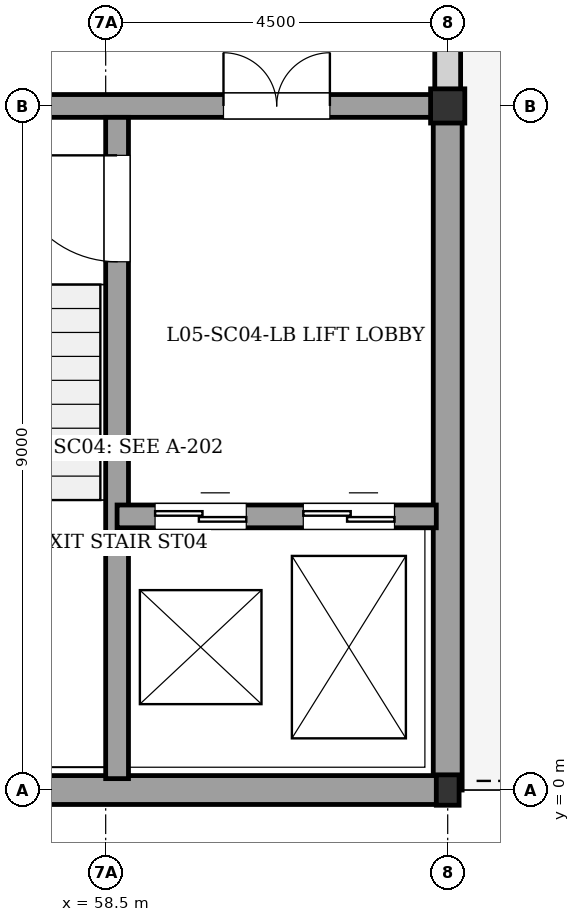
"""IFC4 building model, lengths in metres.
Left out: names, types, materials, properties, quantities, classifications, styles, units other than length and angle.
Written with IfcOpenShell. Run it as: python <this file> out.ifc"""

import sys

from ifc_helpers import new_model, si_unit, direction, frame, frame_2d, origin, origin_2d, place, context, subcontext, project, spatial, rectangle, i_section, extrude, element, fill, save


model = new_model("IFC4")
c1 = context("Model", 3, precision=1e-05, world=origin(), true_north=direction((0.0, 1.0)))
c2 = subcontext(c1, "Body", "Model", "MODEL_VIEW")
j1 = project(units=[si_unit("LENGTHUNIT", "METRE"), si_unit("PLANEANGLEUNIT", "RADIAN")], contexts=[c1])
p1 = place(None, origin())
s1 = spatial("IfcSite", under=j1, at=p1, CompositionType="ELEMENT")
p2 = place(p1, origin())
s2 = spatial("IfcBuilding", under=s1, at=p2, CompositionType="ELEMENT")
p3 = place(p2, frame((0.0, 0.0, 17.6)))
s3 = spatial("IfcBuildingStorey", under=s2, at=p3, CompositionType="ELEMENT", Elevation=17.6)
p4 = place(p3, frame((63.0, 0.0, 0.0), z_axis=(0.0, 0.0, 1.0), x_axis=(1.0, 0.0, 0.0)))
e1 = element("IfcColumn", 1, at=p4, inside=s3, PredefinedType="COLUMN", context=c2, shape_type="SweptSolid", body=[
    extrude(i_section(OverallWidth=0.3, OverallDepth=0.4, WebThickness=0.013, FlangeThickness=0.024, at=origin_2d()), origin(), (0.0, 0.0, 1.0), 3.04),
])
p5 = place(p3, frame((63.0, 9.0, 0.0), z_axis=(0.0, 0.0, 1.0), x_axis=(1.0, 0.0, 0.0)))
e2 = element("IfcColumn", 2, at=p5, inside=s3, PredefinedType="COLUMN", context=c2, shape_type="SweptSolid", body=[
    extrude(rectangle(XDim=0.45, YDim=0.45, at=origin_2d()), origin(), (0.0, 0.0, 1.0), 3.04),
])
p6 = place(p3, frame((63.0, 17.845, 0.0), z_axis=(0.0, 0.0, 1.0), x_axis=(0.0, -1.0, 0.0)))
e3 = element("IfcWall", 3, at=p6, inside=s3, PredefinedType="SOLIDWALL", context=c2, shape_type="SweptSolid", body=[
    extrude(rectangle(XDim=8.715, YDim=0.34, at=frame_2d((4.357, 0.0))), origin(), (0.0, 0.0, 1.0), 2.45),
])
p7 = place(p6, frame((3.545, 0.0, 0.0)))
e4 = element("IfcOpeningElement", 4, at=p7, cuts=e3, PredefinedType="OPENING", context=c2, shape_type="SweptSolid", body=[
    extrude(rectangle(XDim=1.6, YDim=2.25, at=frame_2d((0.8, 1.125))), frame((0.0, 0.18, 0.0), z_axis=(0.0, -1.0, 0.0), x_axis=(1.0, 0.0, 0.0)), (0.0, 0.0, 1.0), 0.36),
])
for number, where, z_axis, x_axis in (
    (5, (63.0, 9.0, 0.0), (0.0, 0.0, 1.0), (0.0, -1.0, 0.0)),
    (6, (63.0, 0.0, 0.0), (0.0, 0.0, 1.0), (-1.0, 0.0, 0.0)),
):
    element("IfcWall", number, at=place(p3, frame(where, z_axis=z_axis, x_axis=x_axis)), inside=s3, PredefinedType="SOLIDWALL", context=c2, shape_type="SweptSolid", body=[
        extrude(rectangle(XDim=9.0, YDim=0.38, at=frame_2d((4.5, 0.0))), origin(), (0.0, 0.0, 1.0), 2.82),
    ])
p8 = place(p3, frame((54.0, 9.0, 0.0), z_axis=(0.0, 0.0, 1.0), x_axis=(1.0, 0.0, 0.0)))
e7 = element("IfcWall", 7, at=p8, inside=s3, PredefinedType="SHEAR", context=c2, shape_type="SweptSolid", body=[
    extrude(rectangle(XDim=9.0, YDim=0.3, at=frame_2d((4.5, 0.0))), origin(), (0.0, 0.0, 1.0), 2.82),
])
p9 = place(p8, frame((6.05, 0.0, 0.0)))
e8 = element("IfcOpeningElement", 8, at=p9, cuts=e7, PredefinedType="OPENING", context=c2, shape_type="SweptSolid", body=[
    extrude(rectangle(XDim=1.4, YDim=2.02, at=frame_2d((0.7, 1.01))), frame((0.0, 0.16, 0.0), z_axis=(0.0, -1.0, 0.0), x_axis=(1.0, 0.0, 0.0)), (0.0, 0.0, 1.0), 0.32),
])
p10 = place(p3, frame((58.65, 0.15, 0.0), z_axis=(0.0, 0.0, 1.0), x_axis=(0.0, 1.0, 0.0)))
e9 = element("IfcWall", 9, at=p10, inside=s3, PredefinedType="SHEAR", context=c2, shape_type="SweptSolid", body=[
    extrude(rectangle(XDim=8.7, YDim=0.3, at=frame_2d((4.35, 0.0))), origin(), (0.0, 0.0, 1.0), 2.82),
])
p11 = place(p10, frame((6.8, 0.0, 0.0)))
e10 = element("IfcOpeningElement", 10, at=p11, cuts=e9, PredefinedType="OPENING", context=c2, shape_type="SweptSolid", body=[
    extrude(rectangle(XDim=1.4, YDim=2.02, at=frame_2d((0.7, 1.01))), frame((0.0, 0.16, 0.0), z_axis=(0.0, -1.0, 0.0), x_axis=(1.0, 0.0, 0.0)), (0.0, 0.0, 1.0), 0.32),
])
p12 = place(p3, frame((58.65, 3.6, 0.0), z_axis=(0.0, 0.0, 1.0), x_axis=(1.0, 0.0, 0.0)))
e11 = element("IfcWall", 11, at=p12, inside=s3, PredefinedType="SHEAR", context=c2, shape_type="SweptSolid", body=[
    extrude(rectangle(XDim=4.2, YDim=0.3, at=frame_2d((2.1, 0.0))), origin(), (0.0, 0.0, 1.0), 2.82),
])
p13 = place(p12, frame((0.5, 0.0, 0.0)))
e12 = element("IfcOpeningElement", 12, at=p13, cuts=e11, PredefinedType="OPENING", context=c2, shape_type="SweptSolid", body=[
    extrude(rectangle(XDim=1.2, YDim=2.2, at=frame_2d((0.6, 1.1))), frame((0.0, 0.16, 0.0), z_axis=(0.0, -1.0, 0.0), x_axis=(1.0, 0.0, 0.0)), (0.0, 0.0, 1.0), 0.32),
])
p14 = place(p12, frame((2.45, 0.0, 0.0)))
e13 = element("IfcOpeningElement", 13, at=p14, cuts=e11, PredefinedType="OPENING", context=c2, shape_type="SweptSolid", body=[
    extrude(rectangle(XDim=1.2, YDim=2.2, at=frame_2d((0.6, 1.1))), frame((0.0, 0.16, 0.0), z_axis=(0.0, -1.0, 0.0), x_axis=(1.0, 0.0, 0.0)), (0.0, 0.0, 1.0), 0.32),
])
p15 = place(p9, origin())
e14 = element("IfcDoor", 14, at=p15, inside=s3, OperationType="DOUBLE_DOOR_SINGLE_SWING", PredefinedType="DOOR", context=c2, shape_type="SweptSolid", body=[
    extrude(rectangle(XDim=1.4, YDim=2.02, at=frame_2d((0.7, 1.01))), frame((0.0, 0.025, 0.0), z_axis=(0.0, -1.0, 0.0), x_axis=(1.0, 0.0, 0.0)), (0.0, 0.0, 1.0), 0.05),
])
fill(e8, e14)
p16 = place(p11, origin())
e15 = element("IfcDoor", 15, at=p16, inside=s3, OperationType="SINGLE_SWING_RIGHT", PredefinedType="DOOR", context=c2, shape_type="SweptSolid", body=[
    extrude(rectangle(XDim=1.4, YDim=2.02, at=frame_2d((0.7, 1.01))), frame((0.0, 0.025, 0.0), z_axis=(0.0, -1.0, 0.0), x_axis=(1.0, 0.0, 0.0)), (0.0, 0.0, 1.0), 0.05),
])
fill(e10, e15)
p17 = place(p13, origin())
e16 = element("IfcDoor", 16, at=p17, inside=s3, OperationType="DOUBLE_DOOR_SLIDING", PredefinedType="DOOR", context=c2, shape_type="SweptSolid", body=[
    extrude(rectangle(XDim=1.2, YDim=2.2, at=frame_2d((0.6, 1.1))), frame((0.0, 0.025, 0.0), z_axis=(0.0, -1.0, 0.0), x_axis=(1.0, 0.0, 0.0)), (0.0, 0.0, 1.0), 0.05),
])
fill(e12, e16)
p18 = place(p14, origin())
e17 = element("IfcDoor", 17, at=p18, inside=s3, OperationType="DOUBLE_DOOR_SLIDING", PredefinedType="DOOR", context=c2, shape_type="SweptSolid", body=[
    extrude(rectangle(XDim=1.2, YDim=2.2, at=frame_2d((0.6, 1.1))), frame((0.0, 0.025, 0.0), z_axis=(0.0, -1.0, 0.0), x_axis=(1.0, 0.0, 0.0)), (0.0, 0.0, 1.0), 0.05),
])
fill(e13, e17)
save(model, sys.argv[1])
